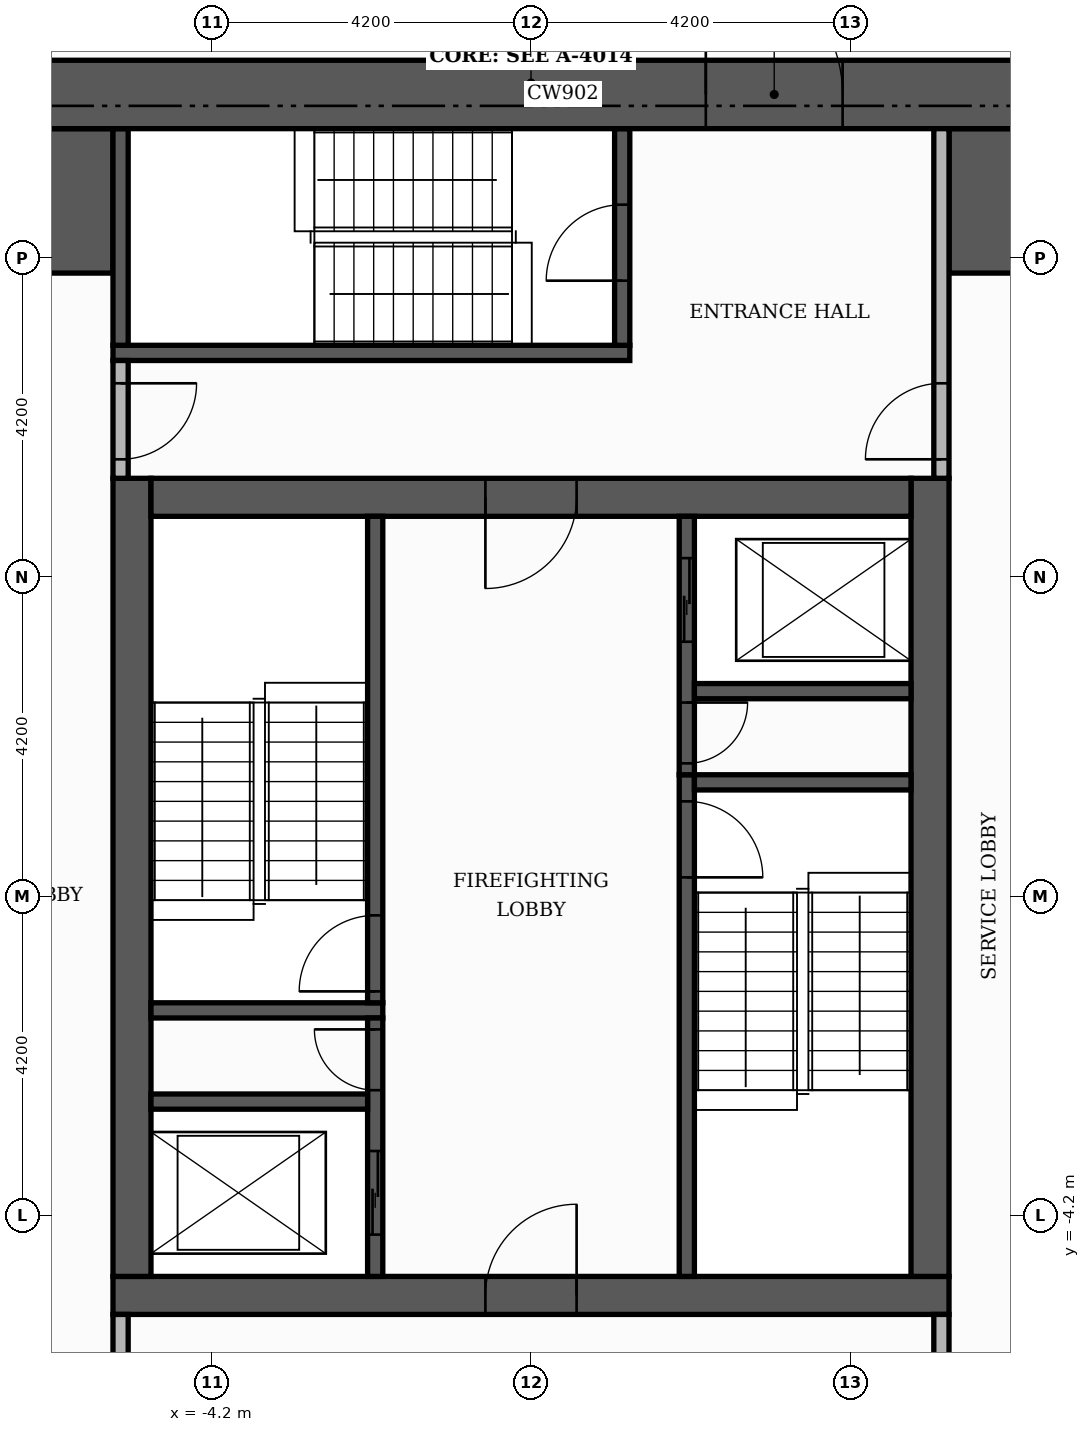
"""IFC4 building model, lengths in metres.
Left out: names, types, materials, properties, quantities, classifications, styles, units other than length and angle.
Written with IfcOpenShell. Run it as: python <this file> out.ifc"""

import sys

from ifc_helpers import new_model, si_unit, direction, frame, frame_2d, origin, place, context, subcontext, project, spatial, rectangle, extrude, element, fill, save


model = new_model("IFC4")
c1 = context("Model", 3, precision=1e-05, world=origin(), true_north=direction((0.0, 1.0)))
c2 = subcontext(c1, "Body", "Model", "MODEL_VIEW")
j1 = project(units=[si_unit("LENGTHUNIT", "METRE"), si_unit("PLANEANGLEUNIT", "RADIAN")], contexts=[c1])
p1 = place(None, origin())
s1 = spatial("IfcSite", under=j1, at=p1, CompositionType="ELEMENT")
p2 = place(p1, origin())
s2 = spatial("IfcBuilding", under=s1, at=p2, CompositionType="ELEMENT")
p3 = place(p2, frame((0.0, 0.0, 90.9)))
s3 = spatial("IfcBuildingStorey", under=s2, at=p3, CompositionType="ELEMENT", Elevation=90.9)
p4 = place(p3, frame((-5.5, -5.25, 0.0), z_axis=(0.0, 0.0, 1.0), x_axis=(1.0, 0.0, 0.0)))
e1 = element("IfcWall", 1, at=p4, inside=s3, PredefinedType="SHEAR", context=c2, shape_type="SweptSolid", body=[
    extrude(rectangle(XDim=11.0, YDim=0.5, at=frame_2d((5.5, 0.0))), origin(), (0.0, 0.0, 1.0), 3.48),
])
p5 = place(p4, frame((4.9, 0.0, 0.0)))
e2 = element("IfcOpeningElement", 2, at=p5, cuts=e1, PredefinedType="OPENING", context=c2, shape_type="SweptSolid", body=[
    extrude(rectangle(XDim=1.2, YDim=2.1, at=frame_2d((0.6, 1.05))), frame((0.0, 0.26, 0.0), z_axis=(0.0, -1.0, 0.0), x_axis=(1.0, 0.0, 0.0)), (0.0, 0.0, 1.0), 0.52),
])
for number, where, z_axis, x_axis in (
    (3, (-5.25, -5.0, 0.0), (0.0, 0.0, 1.0), (0.0, 1.0, 0.0)),
    (4, (5.25, -5.0, 0.0), (0.0, 0.0, 1.0), (0.0, 1.0, 0.0)),
):
    element("IfcWall", number, at=place(p3, frame(where, z_axis=z_axis, x_axis=x_axis)), inside=s3, PredefinedType="SHEAR", context=c2, shape_type="SweptSolid", body=[
        extrude(rectangle(XDim=10.5, YDim=0.5, at=frame_2d((5.25, 0.0))), origin(), (0.0, 0.0, 1.0), 3.48),
    ])
p6 = place(p3, frame((-5.0, 5.25, 0.0), z_axis=(0.0, 0.0, 1.0), x_axis=(1.0, 0.0, 0.0)))
e5 = element("IfcWall", 5, at=p6, inside=s3, PredefinedType="SHEAR", context=c2, shape_type="SweptSolid", body=[
    extrude(rectangle(XDim=10.0, YDim=0.5, at=frame_2d((5.0, 0.0))), origin(), (0.0, 0.0, 1.0), 3.48),
])
p7 = place(p6, frame((4.4, 0.0, 0.0)))
e6 = element("IfcOpeningElement", 6, at=p7, cuts=e5, PredefinedType="OPENING", context=c2, shape_type="SweptSolid", body=[
    extrude(rectangle(XDim=1.2, YDim=2.1, at=frame_2d((0.6, 1.05))), frame((0.0, 0.26, 0.0), z_axis=(0.0, -1.0, 0.0), x_axis=(1.0, 0.0, 0.0)), (0.0, 0.0, 1.0), 0.52),
])
for number, where, z_axis, x_axis in (
    (7, (-10.1, 9.15, 0.0), (0.0, 0.0, 1.0), (1.0, 0.0, 0.0)),
    (8, (5.5, 9.15, 0.0), (0.0, 0.0, 1.0), (1.0, 0.0, 0.0)),
):
    element("IfcWall", number, at=place(p3, frame(where, z_axis=z_axis, x_axis=x_axis)), inside=s3, PredefinedType="SHEAR", context=c2, shape_type="SweptSolid", body=[
        extrude(rectangle(XDim=4.6, YDim=1.9, at=frame_2d((2.3, 0.0))), origin(), (0.0, 0.0, 1.0), 3.48),
    ])
p8 = place(p3, frame((2.05, -5.0, 0.0), z_axis=(0.0, 0.0, 1.0), x_axis=(0.0, 1.0, 0.0)))
e9 = element("IfcWall", 9, at=p8, inside=s3, PredefinedType="SHEAR", context=c2, shape_type="SweptSolid", body=[
    extrude(rectangle(XDim=6.6, YDim=0.2, at=frame_2d((3.3, 0.0))), origin(), (0.0, 0.0, 1.0), 3.48),
])
p9 = place(p8, frame((5.25, 0.0, 0.0)))
e10 = element("IfcOpeningElement", 10, at=p9, cuts=e9, PredefinedType="OPENING", context=c2, shape_type="SweptSolid", body=[
    extrude(rectangle(XDim=1.0, YDim=2.1, at=frame_2d((0.5, 1.05))), frame((0.0, 0.11, 0.0), z_axis=(0.0, -1.0, 0.0), x_axis=(1.0, 0.0, 0.0)), (0.0, 0.0, 1.0), 0.22),
])
p10 = place(p3, frame((-5.0, -1.5, 0.0), z_axis=(0.0, 0.0, 1.0), x_axis=(1.0, 0.0, 0.0)))
e11 = element("IfcWall", 11, at=p10, inside=s3, PredefinedType="SHEAR", context=c2, shape_type="SweptSolid", body=[
    extrude(rectangle(XDim=3.05, YDim=0.2, at=frame_2d((1.525, 0.0))), origin(), (0.0, 0.0, 1.0), 3.48),
])
p11 = place(p3, frame((-2.05, -1.4, 0.0), z_axis=(0.0, 0.0, 1.0), x_axis=(0.0, 1.0, 0.0)))
e12 = element("IfcWall", 12, at=p11, inside=s3, PredefinedType="SHEAR", context=c2, shape_type="SweptSolid", body=[
    extrude(rectangle(XDim=6.4, YDim=0.2, at=frame_2d((3.2, 0.0))), origin(), (0.0, 0.0, 1.0), 3.48),
])
p12 = place(p11, frame((0.15, 0.0, 0.0)))
e13 = element("IfcOpeningElement", 13, at=p12, cuts=e12, PredefinedType="OPENING", context=c2, shape_type="SweptSolid", body=[
    extrude(rectangle(XDim=1.0, YDim=2.1, at=frame_2d((0.5, 1.05))), frame((0.0, 0.11, 0.0), z_axis=(0.0, -1.0, 0.0), x_axis=(1.0, 0.0, 0.0)), (0.0, 0.0, 1.0), 0.22),
])
p13 = place(p3, frame((2.15, 1.5, 0.0), z_axis=(0.0, 0.0, 1.0), x_axis=(1.0, 0.0, 0.0)))
e14 = element("IfcWall", 14, at=p13, inside=s3, PredefinedType="SHEAR", context=c2, shape_type="SweptSolid", body=[
    extrude(rectangle(XDim=2.85, YDim=0.2, at=frame_2d((1.425, 0.0))), origin(), (0.0, 0.0, 1.0), 3.48),
])
p14 = place(p3, frame((-5.5, 7.15, 0.0), z_axis=(0.0, 0.0, 1.0), x_axis=(1.0, 0.0, 0.0)))
e15 = element("IfcWall", 15, at=p14, inside=s3, PredefinedType="SHEAR", context=c2, shape_type="SweptSolid", body=[
    extrude(rectangle(XDim=6.8, YDim=0.2, at=frame_2d((3.4, 0.0))), origin(), (0.0, 0.0, 1.0), 3.48),
])
p15 = place(p3, frame((-5.4, 7.25, 0.0), z_axis=(0.0, 0.0, 1.0), x_axis=(0.0, 1.0, 0.0)))
e16 = element("IfcWall", 16, at=p15, inside=s3, PredefinedType="SHEAR", context=c2, shape_type="SweptSolid", body=[
    extrude(rectangle(XDim=2.85, YDim=0.2, at=frame_2d((1.425, 0.0))), origin(), (0.0, 0.0, 1.0), 3.48),
])
p16 = place(p3, frame((1.2, 7.25, 0.0), z_axis=(0.0, 0.0, 1.0), x_axis=(0.0, 1.0, 0.0)))
e17 = element("IfcWall", 17, at=p16, inside=s3, PredefinedType="SHEAR", context=c2, shape_type="SweptSolid", body=[
    extrude(rectangle(XDim=2.85, YDim=0.2, at=frame_2d((1.425, 0.0))), origin(), (0.0, 0.0, 1.0), 3.48),
])
p17 = place(p16, frame((0.85, 0.0, 0.0)))
e18 = element("IfcOpeningElement", 18, at=p17, cuts=e17, PredefinedType="OPENING", context=c2, shape_type="SweptSolid", body=[
    extrude(rectangle(XDim=1.0, YDim=2.1, at=frame_2d((0.5, 1.05))), frame((0.0, 0.11, 0.0), z_axis=(0.0, -1.0, 0.0), x_axis=(1.0, 0.0, 0.0)), (0.0, 0.0, 1.0), 0.22),
])
p18 = place(p3, frame((-2.05, -5.0, 0.0), z_axis=(0.0, 0.0, 1.0), x_axis=(0.0, 1.0, 0.0)))
e19 = element("IfcWall", 19, at=p18, inside=s3, PredefinedType="SHEAR", context=c2, shape_type="SweptSolid", body=[
    extrude(rectangle(XDim=3.4, YDim=0.2, at=frame_2d((1.7, 0.0))), origin(), (0.0, 0.0, 1.0), 3.48),
])
p19 = place(p18, frame((0.55, 0.0, 0.0)))
e20 = element("IfcOpeningElement", 20, at=p19, cuts=e19, PredefinedType="OPENING", context=c2, shape_type="SweptSolid", body=[
    extrude(rectangle(XDim=1.1, YDim=2.1, at=frame_2d((0.55, 1.05))), frame((0.0, 0.11, 0.0), z_axis=(0.0, -1.0, 0.0), x_axis=(1.0, 0.0, 0.0)), (0.0, 0.0, 1.0), 0.22),
])
p20 = place(p18, frame((2.45, 0.0, 0.0)))
e21 = element("IfcOpeningElement", 21, at=p20, cuts=e19, PredefinedType="OPENING", context=c2, shape_type="SweptSolid", body=[
    extrude(rectangle(XDim=0.8, YDim=2.1, at=frame_2d((0.4, 1.05))), frame((0.0, 0.11, 0.0), z_axis=(0.0, -1.0, 0.0), x_axis=(1.0, 0.0, 0.0)), (0.0, 0.0, 1.0), 0.22),
])
p21 = place(p3, frame((-5.0, -2.7, 0.0), z_axis=(0.0, 0.0, 1.0), x_axis=(1.0, 0.0, 0.0)))
e22 = element("IfcWall", 22, at=p21, inside=s3, PredefinedType="SHEAR", context=c2, shape_type="SweptSolid", body=[
    extrude(rectangle(XDim=2.85, YDim=0.2, at=frame_2d((1.425, 0.0))), origin(), (0.0, 0.0, 1.0), 3.48),
])
p22 = place(p3, frame((2.05, 1.6, 0.0), z_axis=(0.0, 0.0, 1.0), x_axis=(0.0, 1.0, 0.0)))
e23 = element("IfcWall", 23, at=p22, inside=s3, PredefinedType="SHEAR", context=c2, shape_type="SweptSolid", body=[
    extrude(rectangle(XDim=3.4, YDim=0.2, at=frame_2d((1.7, 0.0))), origin(), (0.0, 0.0, 1.0), 3.48),
])
p23 = place(p22, frame((1.75, 0.0, 0.0)))
e24 = element("IfcOpeningElement", 24, at=p23, cuts=e23, PredefinedType="OPENING", context=c2, shape_type="SweptSolid", body=[
    extrude(rectangle(XDim=1.1, YDim=2.1, at=frame_2d((0.55, 1.05))), frame((0.0, 0.11, 0.0), z_axis=(0.0, -1.0, 0.0), x_axis=(1.0, 0.0, 0.0)), (0.0, 0.0, 1.0), 0.22),
])
p24 = place(p22, frame((0.15, 0.0, 0.0)))
e25 = element("IfcOpeningElement", 25, at=p24, cuts=e23, PredefinedType="OPENING", context=c2, shape_type="SweptSolid", body=[
    extrude(rectangle(XDim=0.8, YDim=2.1, at=frame_2d((0.4, 1.05))), frame((0.0, 0.11, 0.0), z_axis=(0.0, -1.0, 0.0), x_axis=(1.0, 0.0, 0.0)), (0.0, 0.0, 1.0), 0.22),
])
p25 = place(p3, frame((2.15, 2.7, 0.0), z_axis=(0.0, 0.0, 1.0), x_axis=(1.0, 0.0, 0.0)))
e26 = element("IfcWall", 26, at=p25, inside=s3, PredefinedType="SHEAR", context=c2, shape_type="SweptSolid", body=[
    extrude(rectangle(XDim=2.85, YDim=0.2, at=frame_2d((1.425, 0.0))), origin(), (0.0, 0.0, 1.0), 3.48),
])
p26 = place(p3, frame((-11.0, 10.55, 0.0), z_axis=(0.0, 0.0, 1.0), x_axis=(1.0, 0.0, 0.0)))
e27 = element("IfcWall", 27, at=p26, inside=s3, PredefinedType="SHEAR", context=c2, shape_type="SweptSolid", body=[
    extrude(rectangle(XDim=22.0, YDim=0.9, at=frame_2d((11.0, 0.0))), origin(), (0.0, 0.0, 1.0), 3.48),
])
p27 = place(p26, frame((13.3, 0.0, 0.0)))
e28 = element("IfcOpeningElement", 28, at=p27, cuts=e27, PredefinedType="OPENING", context=c2, shape_type="SweptSolid", body=[
    extrude(rectangle(XDim=1.8, YDim=2.2, at=frame_2d((0.9, 1.1))), frame((0.0, 0.46, 0.0), z_axis=(0.0, -1.0, 0.0), x_axis=(1.0, 0.0, 0.0)), (0.0, 0.0, 1.0), 0.92),
])
p28 = place(p3, frame((-5.4, -10.1, 0.0), z_axis=(0.0, 0.0, 1.0), x_axis=(0.0, 1.0, 0.0)))
e29 = element("IfcWall", 29, at=p28, inside=s3, PredefinedType="PARTITIONING", context=c2, shape_type="SweptSolid", body=[
    extrude(rectangle(XDim=4.6, YDim=0.2, at=frame_2d((2.3, 0.0))), origin(), (0.0, 0.0, 1.0), 3.48),
])
p29 = place(p28, frame((2.9, 0.0, 0.0)))
e30 = element("IfcOpeningElement", 30, at=p29, cuts=e29, PredefinedType="OPENING", context=c2, shape_type="SweptSolid", body=[
    extrude(rectangle(XDim=1.0, YDim=2.1, at=frame_2d((0.5, 1.05))), frame((0.0, 0.11, 0.0), z_axis=(0.0, -1.0, 0.0), x_axis=(1.0, 0.0, 0.0)), (0.0, 0.0, 1.0), 0.22),
])
p30 = place(p3, frame((5.4, -7.9, 0.0), z_axis=(0.0, 0.0, 1.0), x_axis=(0.0, 1.0, 0.0)))
e31 = element("IfcWall", 31, at=p30, inside=s3, PredefinedType="PARTITIONING", context=c2, shape_type="SweptSolid", body=[
    extrude(rectangle(XDim=2.4, YDim=0.2, at=frame_2d((1.2, 0.0))), origin(), (0.0, 0.0, 1.0), 3.48),
])
p31 = place(p30, frame((0.7, 0.0, 0.0)))
e32 = element("IfcOpeningElement", 32, at=p31, cuts=e31, PredefinedType="OPENING", context=c2, shape_type="SweptSolid", body=[
    extrude(rectangle(XDim=1.0, YDim=2.1, at=frame_2d((0.5, 1.05))), frame((0.0, 0.11, 0.0), z_axis=(0.0, -1.0, 0.0), x_axis=(1.0, 0.0, 0.0)), (0.0, 0.0, 1.0), 0.22),
])
p32 = place(p3, frame((-5.4, 5.5, 0.0), z_axis=(0.0, 0.0, 1.0), x_axis=(0.0, 1.0, 0.0)))
e33 = element("IfcWall", 33, at=p32, inside=s3, PredefinedType="PARTITIONING", context=c2, shape_type="SweptSolid", body=[
    extrude(rectangle(XDim=1.55, YDim=0.2, at=frame_2d((0.775, 0.0))), origin(), (0.0, 0.0, 1.0), 3.48),
])
p33 = place(p32, frame((0.25, 0.0, 0.0)))
e34 = element("IfcOpeningElement", 34, at=p33, cuts=e33, PredefinedType="OPENING", context=c2, shape_type="SweptSolid", body=[
    extrude(rectangle(XDim=1.0, YDim=2.1, at=frame_2d((0.5, 1.05))), frame((0.0, 0.11, 0.0), z_axis=(0.0, -1.0, 0.0), x_axis=(1.0, 0.0, 0.0)), (0.0, 0.0, 1.0), 0.22),
])
p34 = place(p3, frame((5.4, 5.5, 0.0), z_axis=(0.0, 0.0, 1.0), x_axis=(0.0, 1.0, 0.0)))
e35 = element("IfcWall", 35, at=p34, inside=s3, PredefinedType="PARTITIONING", context=c2, shape_type="SweptSolid", body=[
    extrude(rectangle(XDim=4.6, YDim=0.2, at=frame_2d((2.3, 0.0))), origin(), (0.0, 0.0, 1.0), 3.48),
])
p35 = place(p34, frame((0.25, 0.0, 0.0)))
e36 = element("IfcOpeningElement", 36, at=p35, cuts=e35, PredefinedType="OPENING", context=c2, shape_type="SweptSolid", body=[
    extrude(rectangle(XDim=1.0, YDim=2.1, at=frame_2d((0.5, 1.05))), frame((0.0, 0.11, 0.0), z_axis=(0.0, -1.0, 0.0), x_axis=(1.0, 0.0, 0.0)), (0.0, 0.0, 1.0), 0.22),
])
p36 = place(p23, origin())
e37 = element("IfcDoor", 37, at=p36, inside=s3, OperationType="SLIDING_TO_LEFT", PredefinedType="DOOR", context=c2, shape_type="SweptSolid", body=[
    extrude(rectangle(XDim=1.1, YDim=2.1, at=frame_2d((0.55, 1.05))), frame((0.0, 0.025, 0.0), z_axis=(0.0, -1.0, 0.0), x_axis=(1.0, 0.0, 0.0)), (0.0, 0.0, 1.0), 0.05),
])
fill(e24, e37)
p37 = place(p19, origin())
e38 = element("IfcDoor", 38, at=p37, inside=s3, OperationType="SLIDING_TO_LEFT", PredefinedType="DOOR", context=c2, shape_type="SweptSolid", body=[
    extrude(rectangle(XDim=1.1, YDim=2.1, at=frame_2d((0.55, 1.05))), frame((0.0, 0.025, 0.0), z_axis=(0.0, -1.0, 0.0), x_axis=(1.0, 0.0, 0.0)), (0.0, 0.0, 1.0), 0.05),
])
fill(e20, e38)
p38 = place(p12, origin())
e39 = element("IfcDoor", 39, at=p38, inside=s3, OperationType="SINGLE_SWING_LEFT", PredefinedType="DOOR", context=c2, shape_type="SweptSolid", body=[
    extrude(rectangle(XDim=1.0, YDim=2.1, at=frame_2d((0.5, 1.05))), frame((0.0, 0.025, 0.0), z_axis=(0.0, -1.0, 0.0), x_axis=(1.0, 0.0, 0.0)), (0.0, 0.0, 1.0), 0.05),
])
fill(e13, e39)
p39 = place(p9, frame((1.0, 0.0, 0.0), z_axis=(0.0, 0.0, 1.0), x_axis=(-1.0, 0.0, 0.0)))
e40 = element("IfcDoor", 40, at=p39, inside=s3, OperationType="SINGLE_SWING_LEFT", PredefinedType="DOOR", context=c2, shape_type="SweptSolid", body=[
    extrude(rectangle(XDim=1.0, YDim=2.1, at=frame_2d((0.5, 1.05))), frame((0.0, 0.025, 0.0), z_axis=(0.0, -1.0, 0.0), x_axis=(1.0, 0.0, 0.0)), (0.0, 0.0, 1.0), 0.05),
])
fill(e10, e40)
p40 = place(p24, frame((0.8, 0.0, 0.0), z_axis=(0.0, 0.0, 1.0), x_axis=(-1.0, 0.0, 0.0)))
e41 = element("IfcDoor", 41, at=p40, inside=s3, OperationType="SINGLE_SWING_RIGHT", PredefinedType="DOOR", context=c2, shape_type="SweptSolid", body=[
    extrude(rectangle(XDim=0.8, YDim=2.1, at=frame_2d((0.4, 1.05))), frame((0.0, 0.025, 0.0), z_axis=(0.0, -1.0, 0.0), x_axis=(1.0, 0.0, 0.0)), (0.0, 0.0, 1.0), 0.05),
])
fill(e25, e41)
p41 = place(p20, origin())
e42 = element("IfcDoor", 42, at=p41, inside=s3, OperationType="SINGLE_SWING_RIGHT", PredefinedType="DOOR", context=c2, shape_type="SweptSolid", body=[
    extrude(rectangle(XDim=0.8, YDim=2.1, at=frame_2d((0.4, 1.05))), frame((0.0, 0.025, 0.0), z_axis=(0.0, -1.0, 0.0), x_axis=(1.0, 0.0, 0.0)), (0.0, 0.0, 1.0), 0.05),
])
fill(e21, e42)
p42 = place(p7, frame((1.2, 0.0, 0.0), z_axis=(0.0, 0.0, 1.0), x_axis=(-1.0, 0.0, 0.0)))
e43 = element("IfcDoor", 43, at=p42, inside=s3, OperationType="SINGLE_SWING_LEFT", PredefinedType="DOOR", context=c2, shape_type="SweptSolid", body=[
    extrude(rectangle(XDim=1.2, YDim=2.1, at=frame_2d((0.6, 1.05))), frame((0.0, 0.025, 0.0), z_axis=(0.0, -1.0, 0.0), x_axis=(1.0, 0.0, 0.0)), (0.0, 0.0, 1.0), 0.05),
])
fill(e6, e43)
p43 = place(p5, origin())
e44 = element("IfcDoor", 44, at=p43, inside=s3, OperationType="SINGLE_SWING_RIGHT", PredefinedType="DOOR", context=c2, shape_type="SweptSolid", body=[
    extrude(rectangle(XDim=1.2, YDim=2.1, at=frame_2d((0.6, 1.05))), frame((0.0, 0.025, 0.0), z_axis=(0.0, -1.0, 0.0), x_axis=(1.0, 0.0, 0.0)), (0.0, 0.0, 1.0), 0.05),
])
fill(e2, e44)
p44 = place(p17, origin())
e45 = element("IfcDoor", 45, at=p44, inside=s3, OperationType="SINGLE_SWING_LEFT", PredefinedType="DOOR", context=c2, shape_type="SweptSolid", body=[
    extrude(rectangle(XDim=1.0, YDim=2.1, at=frame_2d((0.5, 1.05))), frame((0.0, 0.025, 0.0), z_axis=(0.0, -1.0, 0.0), x_axis=(1.0, 0.0, 0.0)), (0.0, 0.0, 1.0), 0.05),
])
fill(e18, e45)
p45 = place(p33, frame((1.0, 0.0, 0.0), z_axis=(0.0, 0.0, 1.0), x_axis=(-1.0, 0.0, 0.0)))
e46 = element("IfcDoor", 46, at=p45, inside=s3, OperationType="SINGLE_SWING_RIGHT", PredefinedType="DOOR", context=c2, shape_type="SweptSolid", body=[
    extrude(rectangle(XDim=1.0, YDim=2.1, at=frame_2d((0.5, 1.05))), frame((0.0, 0.025, 0.0), z_axis=(0.0, -1.0, 0.0), x_axis=(1.0, 0.0, 0.0)), (0.0, 0.0, 1.0), 0.05),
])
fill(e34, e46)
p46 = place(p35, origin())
e47 = element("IfcDoor", 47, at=p46, inside=s3, OperationType="SINGLE_SWING_LEFT", PredefinedType="DOOR", context=c2, shape_type="SweptSolid", body=[
    extrude(rectangle(XDim=1.0, YDim=2.1, at=frame_2d((0.5, 1.05))), frame((0.0, 0.025, 0.0), z_axis=(0.0, -1.0, 0.0), x_axis=(1.0, 0.0, 0.0)), (0.0, 0.0, 1.0), 0.05),
])
fill(e36, e47)
p47 = place(p27, origin())
e48 = element("IfcDoor", 48, at=p47, inside=s3, OperationType="DOUBLE_DOOR_SINGLE_SWING", PredefinedType="DOOR", context=c2, shape_type="SweptSolid", body=[
    extrude(rectangle(XDim=1.8, YDim=2.2, at=frame_2d((0.9, 1.1))), frame((0.0, 0.025, 0.0), z_axis=(0.0, -1.0, 0.0), x_axis=(1.0, 0.0, 0.0)), (0.0, 0.0, 1.0), 0.05),
])
fill(e28, e48)
save(model, sys.argv[1])
